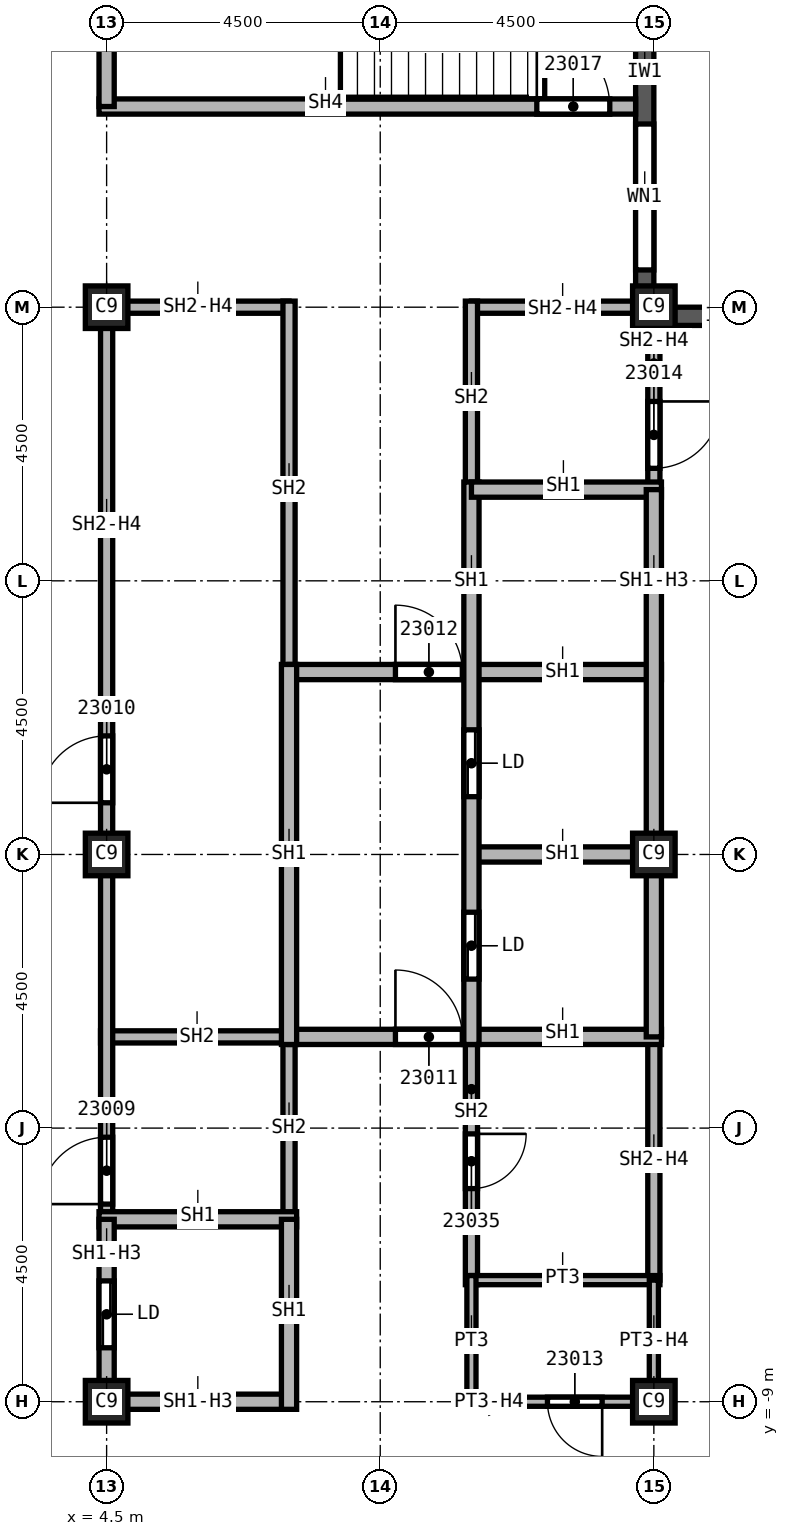
"""IFC4 building model, lengths in metres.
Left out: names, types, materials, properties, quantities, classifications, styles, units other than length and angle.
Written with IfcOpenShell. Run it as: python <this file> out.ifc"""

import sys

from ifc_helpers import new_model, si_unit, direction, frame, frame_2d, origin, origin_2d, place, context, subcontext, project, spatial, rectangle, extrude, element, fill, save


model = new_model("IFC4")
c1 = context("Model", 3, precision=1e-05, world=origin(), true_north=direction((0.0, 1.0)))
c2 = subcontext(c1, "Body", "Model", "MODEL_VIEW")
j1 = project(units=[si_unit("LENGTHUNIT", "METRE"), si_unit("PLANEANGLEUNIT", "RADIAN")], contexts=[c1])
p1 = place(None, origin())
s1 = spatial("IfcSite", under=j1, at=p1, CompositionType="ELEMENT")
p2 = place(p1, origin())
s2 = spatial("IfcBuilding", under=s1, at=p2, CompositionType="ELEMENT")
p3 = place(p2, frame((0.0, 0.0, 326.0)))
s3 = spatial("IfcBuildingStorey", under=s2, at=p3, CompositionType="ELEMENT", Elevation=326.0)
for number, where, z_axis, x_axis in (
    (1, (4.5, 0.0, 0.0), (0.0, 0.0, 1.0), (1.0, 0.0, 0.0)),
    (2, (4.5, 9.0, 0.0), (0.0, 0.0, 1.0), (1.0, 0.0, 0.0)),
    (3, (4.5, -9.0, 0.0), (0.0, 0.0, 1.0), (1.0, 0.0, 0.0)),
    (4, (13.5, 0.0, 0.0), (0.0, 0.0, 1.0), (1.0, 0.0, 0.0)),
    (5, (13.5, 9.0, 0.0), (0.0, 0.0, 1.0), (1.0, 0.0, 0.0)),
    (6, (13.5, -9.0, 0.0), (0.0, 0.0, 1.0), (1.0, 0.0, 0.0)),
):
    element("IfcColumn", number, at=place(p3, frame(where, z_axis=z_axis, x_axis=x_axis)), inside=s3, PredefinedType="COLUMN", context=c2, shape_type="SweptSolid", body=[
        extrude(rectangle(XDim=0.7, YDim=0.7, at=origin_2d()), origin(), (0.0, 0.0, 1.0), 3.74),
    ])
p4 = place(p3, frame((13.35, 9.05, 0.0), z_axis=(0.0, 0.0, 1.0), x_axis=(0.0, 1.0, 0.0)))
e7 = element("IfcWall", 7, at=p4, inside=s3, PredefinedType="SOLIDWALL", context=c2, shape_type="SweptSolid", body=[
    extrude(rectangle(XDim=8.55, YDim=0.3, at=frame_2d((4.275, 0.0))), origin(), (0.0, 0.0, 1.0), 3.14),
])
p5 = place(p4, frame((0.562, 0.0, 0.8)))
e8 = element("IfcOpeningElement", 8, at=p5, cuts=e7, PredefinedType="OPENING", context=c2, shape_type="SweptSolid", body=[
    extrude(rectangle(XDim=2.4, YDim=1.95, at=frame_2d((1.2, 0.975))), frame((0.0, 0.15, 0.0), z_axis=(0.0, -1.0, 0.0), x_axis=(1.0, 0.0, 0.0)), (0.0, 0.0, 1.0), 0.3),
])
p6 = place(p4, frame((4.688, 0.0, 0.8)))
e9 = element("IfcOpeningElement", 9, at=p6, cuts=e7, PredefinedType="OPENING", context=c2, shape_type="SweptSolid", body=[
    extrude(rectangle(XDim=2.4, YDim=1.95, at=frame_2d((1.2, 0.975))), frame((0.0, 0.15, 0.0), z_axis=(0.0, -1.0, 0.0), x_axis=(1.0, 0.0, 0.0)), (0.0, 0.0, 1.0), 0.3),
])
p7 = place(p3, frame((22.1, 8.85, 0.0), z_axis=(0.0, 0.0, 1.0), x_axis=(-1.0, 0.0, 0.0)))
e10 = element("IfcWall", 10, at=p7, inside=s3, PredefinedType="SOLIDWALL", context=c2, shape_type="SweptSolid", body=[
    extrude(rectangle(XDim=8.55, YDim=0.3, at=frame_2d((4.275, 0.0))), origin(), (0.0, 0.0, 1.0), 3.14),
])
p8 = place(p7, frame((1.756, 0.0, 0.8)))
e11 = element("IfcOpeningElement", 11, at=p8, cuts=e10, PredefinedType="OPENING", context=c2, shape_type="SweptSolid", body=[
    extrude(rectangle(XDim=1.4, YDim=1.95, at=frame_2d((0.7, 0.975))), frame((0.0, 0.15, 0.0), z_axis=(0.0, -1.0, 0.0), x_axis=(1.0, 0.0, 0.0)), (0.0, 0.0, 1.0), 0.3),
])
p9 = place(p7, frame((5.044, 0.0, 0.8)))
e12 = element("IfcOpeningElement", 12, at=p9, cuts=e10, PredefinedType="OPENING", context=c2, shape_type="SweptSolid", body=[
    extrude(rectangle(XDim=1.4, YDim=1.95, at=frame_2d((0.7, 0.975))), frame((0.0, 0.15, 0.0), z_axis=(0.0, -1.0, 0.0), x_axis=(1.0, 0.0, 0.0)), (0.0, 0.0, 1.0), 0.3),
])
p10 = place(p3, frame((4.4, -3.0, 0.0), z_axis=(0.0, 0.0, 1.0), x_axis=(1.0, 0.0, 0.0)))
e13 = element("IfcWall", 13, at=p10, inside=s3, PredefinedType="SOLIDWALL", context=c2, shape_type="SweptSolid", body=[
    extrude(rectangle(XDim=3.225, YDim=0.2, at=frame_2d((1.613, 0.0))), origin(), (0.0, 0.0, 1.0), 3.74),
])
p11 = place(p3, frame((4.5, -6.0, 0.0), z_axis=(0.0, 0.0, 1.0), x_axis=(0.0, 1.0, 0.0)))
e14 = element("IfcWall", 14, at=p11, inside=s3, PredefinedType="SOLIDWALL", context=c2, shape_type="SweptSolid", body=[
    extrude(rectangle(XDim=15.1, YDim=0.2, at=frame_2d((7.55, 0.0))), origin(), (0.0, 0.0, 1.0), 3.062),
])
p12 = place(p11, frame((0.25, 0.0, 0.0)))
e15 = element("IfcOpeningElement", 15, at=p12, cuts=e14, PredefinedType="OPENING", context=c2, shape_type="SweptSolid", body=[
    extrude(rectangle(XDim=1.1, YDim=2.1, at=frame_2d((0.55, 1.05))), frame((0.0, 0.1, 0.0), z_axis=(0.0, -1.0, 0.0), x_axis=(1.0, 0.0, 0.0)), (0.0, 0.0, 1.0), 0.2),
])
p13 = place(p11, frame((6.85, 0.0, 0.0)))
e16 = element("IfcOpeningElement", 16, at=p13, cuts=e14, PredefinedType="OPENING", context=c2, shape_type="SweptSolid", body=[
    extrude(rectangle(XDim=1.1, YDim=2.1, at=frame_2d((0.55, 1.05))), frame((0.0, 0.1, 0.0), z_axis=(0.0, -1.0, 0.0), x_axis=(1.0, 0.0, 0.0)), (0.0, 0.0, 1.0), 0.2),
])
p14 = place(p3, frame((4.5, 9.0, 0.0), z_axis=(0.0, 0.0, 1.0), x_axis=(1.0, 0.0, 0.0)))
e17 = element("IfcWall", 17, at=p14, inside=s3, PredefinedType="SOLIDWALL", context=c2, shape_type="SweptSolid", body=[
    extrude(rectangle(XDim=3.0, YDim=0.2, at=frame_2d((1.5, 0.0))), origin(), (0.0, 0.0, 1.0), 3.062),
])
p15 = place(p3, frame((7.5, -2.875, 0.0), z_axis=(0.0, 0.0, 1.0), x_axis=(0.0, -1.0, 0.0)))
e18 = element("IfcWall", 18, at=p15, inside=s3, PredefinedType="SOLIDWALL", context=c2, shape_type="SweptSolid", body=[
    extrude(rectangle(XDim=3.125, YDim=0.2, at=frame_2d((1.562, 0.0))), origin(), (0.0, 0.0, 1.0), 3.74),
])
p16 = place(p3, frame((7.5, 9.1, 0.0), z_axis=(0.0, 0.0, 1.0), x_axis=(0.0, -1.0, 0.0)))
e19 = element("IfcWall", 19, at=p16, inside=s3, PredefinedType="SOLIDWALL", context=c2, shape_type="SweptSolid", body=[
    extrude(rectangle(XDim=6.225, YDim=0.2, at=frame_2d((3.113, 0.0))), origin(), (0.0, 0.0, 1.0), 3.74),
])
p17 = place(p3, frame((10.5, -2.875, 0.0), z_axis=(0.0, 0.0, 1.0), x_axis=(0.0, -1.0, 0.0)))
e20 = element("IfcWall", 20, at=p17, inside=s3, PredefinedType="SOLIDWALL", context=c2, shape_type="SweptSolid", body=[
    extrude(rectangle(XDim=4.2, YDim=0.2, at=frame_2d((2.1, 0.0))), origin(), (0.0, 0.0, 1.0), 3.74),
])
p18 = place(p17, frame((1.72, 0.0, 0.0)))
e21 = element("IfcOpeningElement", 21, at=p18, cuts=e20, PredefinedType="OPENING", context=c2, shape_type="SweptSolid", body=[
    extrude(rectangle(XDim=0.9, YDim=2.1, at=frame_2d((0.45, 1.05))), frame((0.0, 0.1, 0.0), z_axis=(0.0, -1.0, 0.0), x_axis=(1.0, 0.0, 0.0)), (0.0, 0.0, 1.0), 0.2),
])
p19 = place(p3, frame((10.5, 9.0, 0.0), z_axis=(0.0, 0.0, 1.0), x_axis=(1.0, 0.0, 0.0)))
e22 = element("IfcWall", 22, at=p19, inside=s3, PredefinedType="SOLIDWALL", context=c2, shape_type="SweptSolid", body=[
    extrude(rectangle(XDim=3.0, YDim=0.2, at=frame_2d((1.5, 0.0))), origin(), (0.0, 0.0, 1.0), 3.062),
])
p20 = place(p3, frame((10.5, 9.1, 0.0), z_axis=(0.0, 0.0, 1.0), x_axis=(0.0, -1.0, 0.0)))
e23 = element("IfcWall", 23, at=p20, inside=s3, PredefinedType="SOLIDWALL", context=c2, shape_type="SweptSolid", body=[
    extrude(rectangle(XDim=3.225, YDim=0.2, at=frame_2d((1.613, 0.0))), origin(), (0.0, 0.0, 1.0), 3.74),
])
p21 = place(p3, frame((13.5, -3.0, 0.0), z_axis=(0.0, 0.0, 1.0), x_axis=(0.0, -1.0, 0.0)))
e24 = element("IfcWall", 24, at=p21, inside=s3, PredefinedType="SOLIDWALL", context=c2, shape_type="SweptSolid", body=[
    extrude(rectangle(XDim=4.0, YDim=0.2, at=frame_2d((2.0, 0.0))), origin(), (0.0, 0.0, 1.0), 3.062),
])
p22 = place(p3, frame((13.5, 9.05, 0.0), z_axis=(0.0, 0.0, 1.0), x_axis=(0.0, -1.0, 0.0)))
e25 = element("IfcWall", 25, at=p22, inside=s3, PredefinedType="SOLIDWALL", context=c2, shape_type="SweptSolid", body=[
    extrude(rectangle(XDim=3.05, YDim=0.2, at=frame_2d((1.525, 0.0))), origin(), (0.0, 0.0, 1.0), 3.062),
])
p23 = place(p22, frame((1.6, 0.0, 0.0)))
e26 = element("IfcOpeningElement", 26, at=p23, cuts=e25, PredefinedType="OPENING", context=c2, shape_type="SweptSolid", body=[
    extrude(rectangle(XDim=1.1, YDim=2.1, at=frame_2d((0.55, 1.05))), frame((0.0, 0.1, 0.0), z_axis=(0.0, -1.0, 0.0), x_axis=(1.0, 0.0, 0.0)), (0.0, 0.0, 1.0), 0.2),
])
p24 = place(p3, frame((4.375, -6.0, 0.0), z_axis=(0.0, 0.0, 1.0), x_axis=(1.0, 0.0, 0.0)))
e27 = element("IfcWall", 27, at=p24, inside=s3, PredefinedType="SOLIDWALL", context=c2, shape_type="SweptSolid", body=[
    extrude(rectangle(XDim=3.25, YDim=0.25, at=frame_2d((1.625, 0.0))), origin(), (0.0, 0.0, 1.0), 3.74),
])
p25 = place(p3, frame((4.5, -9.125, 0.0), z_axis=(0.0, 0.0, 1.0), x_axis=(0.0, 1.0, 0.0)))
e28 = element("IfcWall", 28, at=p25, inside=s3, PredefinedType="SOLIDWALL", context=c2, shape_type="SweptSolid", body=[
    extrude(rectangle(XDim=3.125, YDim=0.25, at=frame_2d((1.562, 0.0))), origin(), (0.0, 0.0, 1.0), 3.062),
])
p26 = place(p25, frame((1.012, 0.0, 0.0)))
e29 = element("IfcOpeningElement", 29, at=p26, cuts=e28, PredefinedType="OPENING", context=c2, shape_type="SweptSolid", body=[
    extrude(rectangle(XDim=1.1, YDim=2.1, at=frame_2d((0.55, 1.05))), frame((0.0, 0.125, 0.0), z_axis=(0.0, -1.0, 0.0), x_axis=(1.0, 0.0, 0.0)), (0.0, 0.0, 1.0), 0.25),
])
p27 = place(p3, frame((7.5, -9.0, 0.0), z_axis=(0.0, 0.0, 1.0), x_axis=(-1.0, 0.0, 0.0)))
e30 = element("IfcWall", 30, at=p27, inside=s3, PredefinedType="SOLIDWALL", context=c2, shape_type="SweptSolid", body=[
    extrude(rectangle(XDim=3.0, YDim=0.25, at=frame_2d((1.5, 0.0))), origin(), (0.0, 0.0, 1.0), 3.062),
])
p28 = place(p3, frame((7.5, -6.0, 0.0), z_axis=(0.0, 0.0, 1.0), x_axis=(0.0, -1.0, 0.0)))
e31 = element("IfcWall", 31, at=p28, inside=s3, PredefinedType="SOLIDWALL", context=c2, shape_type="SweptSolid", body=[
    extrude(rectangle(XDim=3.125, YDim=0.25, at=frame_2d((1.562, 0.0))), origin(), (0.0, 0.0, 1.0), 3.74),
])
p29 = place(p3, frame((7.5, -3.0, 0.0), z_axis=(0.0, 0.0, 1.0), x_axis=(1.0, 0.0, 0.0)))
e32 = element("IfcWall", 32, at=p29, inside=s3, PredefinedType="SOLIDWALL", context=c2, shape_type="SweptSolid", body=[
    extrude(rectangle(XDim=6.125, YDim=0.25, at=frame_2d((3.062, 0.0))), origin(), (0.0, 0.0, 1.0), 3.74),
])
p30 = place(p29, frame((1.75, 0.0, 0.0)))
e33 = element("IfcOpeningElement", 33, at=p30, cuts=e32, PredefinedType="OPENING", context=c2, shape_type="SweptSolid", body=[
    extrude(rectangle(XDim=1.1, YDim=2.1, at=frame_2d((0.55, 1.05))), frame((0.0, 0.125, 0.0), z_axis=(0.0, -1.0, 0.0), x_axis=(1.0, 0.0, 0.0)), (0.0, 0.0, 1.0), 0.25),
])
p31 = place(p3, frame((7.5, 3.0, 0.0), z_axis=(0.0, 0.0, 1.0), x_axis=(1.0, 0.0, 0.0)))
e34 = element("IfcWall", 34, at=p31, inside=s3, PredefinedType="SOLIDWALL", context=c2, shape_type="SweptSolid", body=[
    extrude(rectangle(XDim=6.125, YDim=0.25, at=frame_2d((3.062, 0.0))), origin(), (0.0, 0.0, 1.0), 3.74),
])
p32 = place(p31, frame((1.75, 0.0, 0.0)))
e35 = element("IfcOpeningElement", 35, at=p32, cuts=e34, PredefinedType="OPENING", context=c2, shape_type="SweptSolid", body=[
    extrude(rectangle(XDim=1.1, YDim=2.1, at=frame_2d((0.55, 1.05))), frame((0.0, 0.125, 0.0), z_axis=(0.0, -1.0, 0.0), x_axis=(1.0, 0.0, 0.0)), (0.0, 0.0, 1.0), 0.25),
])
p33 = place(p3, frame((7.5, 3.125, 0.0), z_axis=(0.0, 0.0, 1.0), x_axis=(0.0, -1.0, 0.0)))
e36 = element("IfcWall", 36, at=p33, inside=s3, PredefinedType="SOLIDWALL", context=c2, shape_type="SweptSolid", body=[
    extrude(rectangle(XDim=6.25, YDim=0.25, at=frame_2d((3.125, 0.0))), origin(), (0.0, 0.0, 1.0), 3.74),
])
p34 = place(p3, frame((10.5, 0.0, 0.0), z_axis=(0.0, 0.0, 1.0), x_axis=(1.0, 0.0, 0.0)))
e37 = element("IfcWall", 37, at=p34, inside=s3, PredefinedType="SOLIDWALL", context=c2, shape_type="SweptSolid", body=[
    extrude(rectangle(XDim=3.125, YDim=0.25, at=frame_2d((1.562, 0.0))), origin(), (0.0, 0.0, 1.0), 3.74),
])
p35 = place(p3, frame((10.5, 6.125, 0.0), z_axis=(0.0, 0.0, 1.0), x_axis=(0.0, -1.0, 0.0)))
e38 = element("IfcWall", 38, at=p35, inside=s3, PredefinedType="SOLIDWALL", context=c2, shape_type="SweptSolid", body=[
    extrude(rectangle(XDim=9.25, YDim=0.25, at=frame_2d((4.625, 0.0))), origin(), (0.0, 0.0, 1.0), 3.74),
])
p36 = place(p35, frame((7.075, 0.0, 0.0)))
e39 = element("IfcOpeningElement", 39, at=p36, cuts=e38, PredefinedType="OPENING", context=c2, shape_type="SweptSolid", body=[
    extrude(rectangle(XDim=1.1, YDim=2.1, at=frame_2d((0.55, 1.05))), frame((0.0, 0.125, 0.0), z_axis=(0.0, -1.0, 0.0), x_axis=(1.0, 0.0, 0.0)), (0.0, 0.0, 1.0), 0.25),
])
p37 = place(p35, frame((4.075, 0.0, 0.0)))
e40 = element("IfcOpeningElement", 40, at=p37, cuts=e38, PredefinedType="OPENING", context=c2, shape_type="SweptSolid", body=[
    extrude(rectangle(XDim=1.1, YDim=2.1, at=frame_2d((0.55, 1.05))), frame((0.0, 0.125, 0.0), z_axis=(0.0, -1.0, 0.0), x_axis=(1.0, 0.0, 0.0)), (0.0, 0.0, 1.0), 0.25),
])
p38 = place(p3, frame((10.5, 6.0, 0.0), z_axis=(0.0, 0.0, 1.0), x_axis=(1.0, 0.0, 0.0)))
e41 = element("IfcWall", 41, at=p38, inside=s3, PredefinedType="SOLIDWALL", context=c2, shape_type="SweptSolid", body=[
    extrude(rectangle(XDim=3.125, YDim=0.25, at=frame_2d((1.562, 0.0))), origin(), (0.0, 0.0, 1.0), 3.74),
])
p39 = place(p3, frame((13.5, 6.0, 0.0), z_axis=(0.0, 0.0, 1.0), x_axis=(0.0, -1.0, 0.0)))
e42 = element("IfcWall", 42, at=p39, inside=s3, PredefinedType="SOLIDWALL", context=c2, shape_type="SweptSolid", body=[
    extrude(rectangle(XDim=9.0, YDim=0.25, at=frame_2d((4.5, 0.0))), origin(), (0.0, 0.0, 1.0), 3.062),
])
p40 = place(p3, frame((4.375, 12.3, 0.0), z_axis=(0.0, 0.0, 1.0), x_axis=(1.0, 0.0, 0.0)))
e43 = element("IfcWall", 43, at=p40, inside=s3, PredefinedType="SOLIDWALL", context=c2, shape_type="SweptSolid", body=[
    extrude(rectangle(XDim=8.825, YDim=0.25, at=frame_2d((4.413, 0.0))), origin(), (0.0, 0.0, 1.0), 3.74),
])
p41 = place(p40, frame((7.2, 0.0, 0.0)))
e44 = element("IfcOpeningElement", 44, at=p41, cuts=e43, PredefinedType="OPENING", context=c2, shape_type="SweptSolid", body=[
    extrude(rectangle(XDim=1.2, YDim=2.1, at=frame_2d((0.6, 1.05))), frame((0.0, 0.125, 0.0), z_axis=(0.0, -1.0, 0.0), x_axis=(1.0, 0.0, 0.0)), (0.0, 0.0, 1.0), 0.25),
])
p42 = place(p3, frame((4.5, 12.3, 0.0), z_axis=(0.0, 0.0, 1.0), x_axis=(0.0, 1.0, 0.0)))
e45 = element("IfcWall", 45, at=p42, inside=s3, PredefinedType="SOLIDWALL", context=c2, shape_type="SweptSolid", body=[
    extrude(rectangle(XDim=4.625, YDim=0.25, at=frame_2d((2.312, 0.0))), origin(), (0.0, 0.0, 1.0), 3.74),
])
p43 = place(p3, frame((10.5, -7.0, 0.0), z_axis=(0.0, 0.0, 1.0), x_axis=(1.0, 0.0, 0.0)))
e46 = element("IfcWall", 46, at=p43, inside=s3, PredefinedType="PARTITIONING", context=c2, shape_type="SweptSolid", body=[
    extrude(rectangle(XDim=3.1, YDim=0.15, at=frame_2d((1.55, 0.0))), origin(), (0.0, 0.0, 1.0), 3.74),
])
p44 = place(p3, frame((10.5, -6.925, 0.0), z_axis=(0.0, 0.0, 1.0), x_axis=(0.0, -1.0, 0.0)))
e47 = element("IfcWall", 47, at=p44, inside=s3, PredefinedType="PARTITIONING", context=c2, shape_type="SweptSolid", body=[
    extrude(rectangle(XDim=2.15, YDim=0.15, at=frame_2d((1.075, 0.0))), origin(), (0.0, 0.0, 1.0), 3.74),
])
p45 = place(p3, frame((13.5, -9.0, 0.0), z_axis=(0.0, 0.0, 1.0), x_axis=(-1.0, 0.0, 0.0)))
e48 = element("IfcWall", 48, at=p45, inside=s3, PredefinedType="PARTITIONING", context=c2, shape_type="SweptSolid", body=[
    extrude(rectangle(XDim=3.0, YDim=0.15, at=frame_2d((1.5, 0.0))), origin(), (0.0, 0.0, 1.0), 3.062),
])
p46 = place(p45, frame((0.85, 0.0, 0.0)))
e49 = element("IfcOpeningElement", 49, at=p46, cuts=e48, PredefinedType="OPENING", context=c2, shape_type="SweptSolid", body=[
    extrude(rectangle(XDim=0.9, YDim=2.1, at=frame_2d((0.45, 1.05))), frame((0.0, 0.075, 0.0), z_axis=(0.0, -1.0, 0.0), x_axis=(1.0, 0.0, 0.0)), (0.0, 0.0, 1.0), 0.15),
])
p47 = place(p3, frame((13.5, -7.0, 0.0), z_axis=(0.0, 0.0, 1.0), x_axis=(0.0, -1.0, 0.0)))
e50 = element("IfcWall", 50, at=p47, inside=s3, PredefinedType="PARTITIONING", context=c2, shape_type="SweptSolid", body=[
    extrude(rectangle(XDim=2.075, YDim=0.15, at=frame_2d((1.038, 0.0))), origin(), (0.0, 0.0, 1.0), 3.062),
])
p48 = place(p5, origin())
e51 = element("IfcWindow", 51, at=p48, inside=s3, PartitioningType="SINGLE_PANEL", PredefinedType="WINDOW", context=c2, shape_type="SweptSolid", body=[
    extrude(rectangle(XDim=2.4, YDim=1.95, at=frame_2d((1.2, 0.975))), frame((0.0, 0.03, 0.0), z_axis=(0.0, -1.0, 0.0), x_axis=(1.0, 0.0, 0.0)), (0.0, 0.0, 1.0), 0.06),
])
fill(e8, e51)
p49 = place(p12, origin())
e52 = element("IfcDoor", 52, at=p49, inside=s3, OperationType="SINGLE_SWING_RIGHT", PredefinedType="DOOR", context=c2, shape_type="SweptSolid", body=[
    extrude(rectangle(XDim=1.1, YDim=2.1, at=frame_2d((0.55, 1.05))), frame((0.0, 0.025, 0.0), z_axis=(0.0, -1.0, 0.0), x_axis=(1.0, 0.0, 0.0)), (0.0, 0.0, 1.0), 0.05),
])
fill(e15, e52)
p50 = place(p13, origin())
e53 = element("IfcDoor", 53, at=p50, inside=s3, OperationType="SINGLE_SWING_LEFT", PredefinedType="DOOR", context=c2, shape_type="SweptSolid", body=[
    extrude(rectangle(XDim=1.1, YDim=2.1, at=frame_2d((0.55, 1.05))), frame((0.0, 0.025, 0.0), z_axis=(0.0, -1.0, 0.0), x_axis=(1.0, 0.0, 0.0)), (0.0, 0.0, 1.0), 0.05),
])
fill(e16, e53)
p51 = place(p30, origin())
e54 = element("IfcDoor", 54, at=p51, inside=s3, OperationType="SINGLE_SWING_RIGHT", PredefinedType="DOOR", context=c2, shape_type="SweptSolid", body=[
    extrude(rectangle(XDim=1.1, YDim=2.1, at=frame_2d((0.55, 1.05))), frame((0.0, 0.025, 0.0), z_axis=(0.0, -1.0, 0.0), x_axis=(1.0, 0.0, 0.0)), (0.0, 0.0, 1.0), 0.05),
])
fill(e33, e54)
p52 = place(p32, origin())
e55 = element("IfcDoor", 55, at=p52, inside=s3, OperationType="SINGLE_SWING_LEFT", PredefinedType="DOOR", context=c2, shape_type="SweptSolid", body=[
    extrude(rectangle(XDim=1.1, YDim=2.1, at=frame_2d((0.55, 1.05))), frame((0.0, 0.025, 0.0), z_axis=(0.0, -1.0, 0.0), x_axis=(1.0, 0.0, 0.0)), (0.0, 0.0, 1.0), 0.05),
])
fill(e35, e55)
p53 = place(p46, origin())
e56 = element("IfcDoor", 56, at=p53, inside=s3, OperationType="SINGLE_SWING_RIGHT", PredefinedType="DOOR", context=c2, shape_type="SweptSolid", body=[
    extrude(rectangle(XDim=0.9, YDim=2.1, at=frame_2d((0.45, 1.05))), frame((0.0, 0.025, 0.0), z_axis=(0.0, -1.0, 0.0), x_axis=(1.0, 0.0, 0.0)), (0.0, 0.0, 1.0), 0.05),
])
fill(e49, e56)
p54 = place(p23, origin())
e57 = element("IfcDoor", 57, at=p54, inside=s3, OperationType="SINGLE_SWING_LEFT", PredefinedType="DOOR", context=c2, shape_type="SweptSolid", body=[
    extrude(rectangle(XDim=1.1, YDim=2.1, at=frame_2d((0.55, 1.05))), frame((0.0, 0.025, 0.0), z_axis=(0.0, -1.0, 0.0), x_axis=(1.0, 0.0, 0.0)), (0.0, 0.0, 1.0), 0.05),
])
fill(e26, e57)
p55 = place(p41, origin())
e58 = element("IfcDoor", 58, at=p55, inside=s3, OperationType="SINGLE_SWING_RIGHT", PredefinedType="DOOR", context=c2, shape_type="SweptSolid", body=[
    extrude(rectangle(XDim=1.2, YDim=2.1, at=frame_2d((0.6, 1.05))), frame((0.0, 0.025, 0.0), z_axis=(0.0, -1.0, 0.0), x_axis=(1.0, 0.0, 0.0)), (0.0, 0.0, 1.0), 0.05),
])
fill(e44, e58)
p56 = place(p18, origin())
e59 = element("IfcDoor", 59, at=p56, inside=s3, OperationType="SINGLE_SWING_LEFT", PredefinedType="DOOR", context=c2, shape_type="SweptSolid", body=[
    extrude(rectangle(XDim=0.9, YDim=2.1, at=frame_2d((0.45, 1.05))), frame((0.0, 0.025, 0.0), z_axis=(0.0, -1.0, 0.0), x_axis=(1.0, 0.0, 0.0)), (0.0, 0.0, 1.0), 0.05),
])
fill(e21, e59)
p57 = place(p26, origin())
e60 = element("IfcDoor", 60, at=p57, inside=s3, OperationType="SLIDING_TO_LEFT", PredefinedType="DOOR", context=c2, shape_type="SweptSolid", body=[
    extrude(rectangle(XDim=1.1, YDim=2.1, at=frame_2d((0.55, 1.05))), frame((0.0, 0.025, 0.0), z_axis=(0.0, -1.0, 0.0), x_axis=(1.0, 0.0, 0.0)), (0.0, 0.0, 1.0), 0.05),
])
fill(e29, e60)
p58 = place(p36, origin())
e61 = element("IfcDoor", 61, at=p58, inside=s3, OperationType="SLIDING_TO_LEFT", PredefinedType="DOOR", context=c2, shape_type="SweptSolid", body=[
    extrude(rectangle(XDim=1.1, YDim=2.1, at=frame_2d((0.55, 1.05))), frame((0.0, 0.025, 0.0), z_axis=(0.0, -1.0, 0.0), x_axis=(1.0, 0.0, 0.0)), (0.0, 0.0, 1.0), 0.05),
])
fill(e39, e61)
p59 = place(p37, origin())
e62 = element("IfcDoor", 62, at=p59, inside=s3, OperationType="SLIDING_TO_LEFT", PredefinedType="DOOR", context=c2, shape_type="SweptSolid", body=[
    extrude(rectangle(XDim=1.1, YDim=2.1, at=frame_2d((0.55, 1.05))), frame((0.0, 0.025, 0.0), z_axis=(0.0, -1.0, 0.0), x_axis=(1.0, 0.0, 0.0)), (0.0, 0.0, 1.0), 0.05),
])
fill(e40, e62)
save(model, sys.argv[1])
